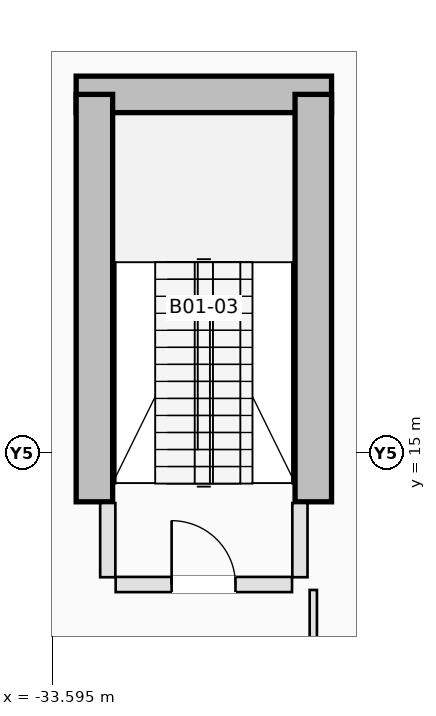
"""IFC4 building model, lengths in metres.
Left out: names, types, materials, properties, quantities, classifications, styles, units other than length and angle.
Written with IfcOpenShell. Run it as: python <this file> out.ifc"""

import sys

from ifc_helpers import new_model, si_unit, direction, frame, frame_2d, origin, place, context, subcontext, project, spatial, rectangle, extrude, element, fill, save


model = new_model("IFC4")
c1 = context("Model", 3, precision=1e-05, world=origin(), true_north=direction((0.0, 1.0)))
c2 = subcontext(c1, "Body", "Model", "MODEL_VIEW")
j1 = project(units=[si_unit("LENGTHUNIT", "METRE"), si_unit("PLANEANGLEUNIT", "RADIAN")], contexts=[c1])
p1 = place(None, origin())
s1 = spatial("IfcSite", under=j1, at=p1, CompositionType="ELEMENT")
p2 = place(p1, origin())
s2 = spatial("IfcBuilding", under=s1, at=p2, CompositionType="ELEMENT")
p3 = place(p2, frame((0.0, 0.0, -5.0)))
s3 = spatial("IfcBuildingStorey", under=s2, at=p3, CompositionType="ELEMENT", Elevation=-5.0)
p4 = place(p3, frame((-33.2, 20.9, 0.0), z_axis=(0.0, 0.0, 1.0), x_axis=(1.0, 0.0, 0.0)))
e1 = element("IfcWall", 1, at=p4, inside=s3, PredefinedType="SHEAR", context=c2, shape_type="SweptSolid", body=[
    extrude(rectangle(XDim=4.2, YDim=0.6, at=frame_2d((2.1, 0.0))), origin(), (0.0, 0.0, 1.0), 5.0),
])
for number, where, z_axis, x_axis in (
    (2, (-32.9, 14.2, 0.0), (0.0, 0.0, 1.0), (0.0, 1.0, 0.0)),
    (3, (-29.3, 14.2, 0.0), (0.0, 0.0, 1.0), (0.0, 1.0, 0.0)),
):
    element("IfcWall", number, at=place(p3, frame(where, z_axis=z_axis, x_axis=x_axis)), inside=s3, PredefinedType="SHEAR", context=c2, shape_type="SweptSolid", body=[
        extrude(rectangle(XDim=6.7, YDim=0.6, at=frame_2d((3.35, 0.0))), origin(), (0.0, 0.0, 1.0), 5.0),
    ])
p5 = place(p3, frame((-32.55, 12.84, 0.0), z_axis=(0.0, 0.0, 1.0), x_axis=(1.0, 0.0, 0.0)))
e4 = element("IfcWall", 4, at=p5, inside=s3, PredefinedType="PARTITIONING", context=c2, shape_type="SweptSolid", body=[
    extrude(rectangle(XDim=2.9, YDim=0.25, at=frame_2d((1.45, 0.0))), origin(), (0.0, 0.0, 1.0), 4.7),
])
p6 = place(p5, frame((0.92, 0.0, 0.0)))
e5 = element("IfcOpeningElement", 5, at=p6, cuts=e4, PredefinedType="OPENING", context=c2, shape_type="SweptSolid", body=[
    extrude(rectangle(XDim=1.05, YDim=2.15, at=frame_2d((0.525, 1.075))), frame((0.0, 0.135, 0.0), z_axis=(0.0, -1.0, 0.0), x_axis=(1.0, 0.0, 0.0)), (0.0, 0.0, 1.0), 0.27),
])
for number, where, z_axis, x_axis in (
    (6, (-32.68, 12.96, 0.0), (0.0, 0.0, 1.0), (0.0, 1.0, 0.0)),
    (7, (-29.52, 12.96, 0.0), (0.0, 0.0, 1.0), (0.0, 1.0, 0.0)),
):
    element("IfcWall", number, at=place(p3, frame(where, z_axis=z_axis, x_axis=x_axis)), inside=s3, PredefinedType="PARTITIONING", context=c2, shape_type="SweptSolid", body=[
        extrude(rectangle(XDim=1.22, YDim=0.25, at=frame_2d((0.61, 0.0))), origin(), (0.0, 0.0, 1.0), 4.7),
    ])
p7 = place(p3, frame((-29.3, -2.338, 0.0), z_axis=(0.0, 0.0, 1.0), x_axis=(0.0, 1.0, 0.0)))
e8 = element("IfcWall", 8, at=p7, inside=s3, PredefinedType="PARTITIONING", context=c2, shape_type="SweptSolid", body=[
    extrude(rectangle(XDim=15.088, YDim=0.12, at=frame_2d((7.544, 0.0))), origin(), (0.0, 0.0, 1.0), 4.7),
])
p8 = place(p7, frame((11.038, 0.0, 0.0)))
e9 = element("IfcOpeningElement", 9, at=p8, cuts=e8, PredefinedType="OPENING", context=c2, shape_type="SweptSolid", body=[
    extrude(rectangle(XDim=1.1, YDim=2.15, at=frame_2d((0.55, 1.075))), frame((0.0, 0.07, 0.0), z_axis=(0.0, -1.0, 0.0), x_axis=(1.0, 0.0, 0.0)), (0.0, 0.0, 1.0), 0.14),
])
p9 = place(p6, origin())
e10 = element("IfcDoor", 10, at=p9, inside=s3, OperationType="SINGLE_SWING_LEFT", PredefinedType="DOOR", context=c2, shape_type="SweptSolid", body=[
    extrude(rectangle(XDim=1.05, YDim=2.15, at=frame_2d((0.525, 1.075))), frame((0.0, 0.025, 0.0), z_axis=(0.0, -1.0, 0.0), x_axis=(1.0, 0.0, 0.0)), (0.0, 0.0, 1.0), 0.05),
])
fill(e5, e10)
save(model, sys.argv[1])
